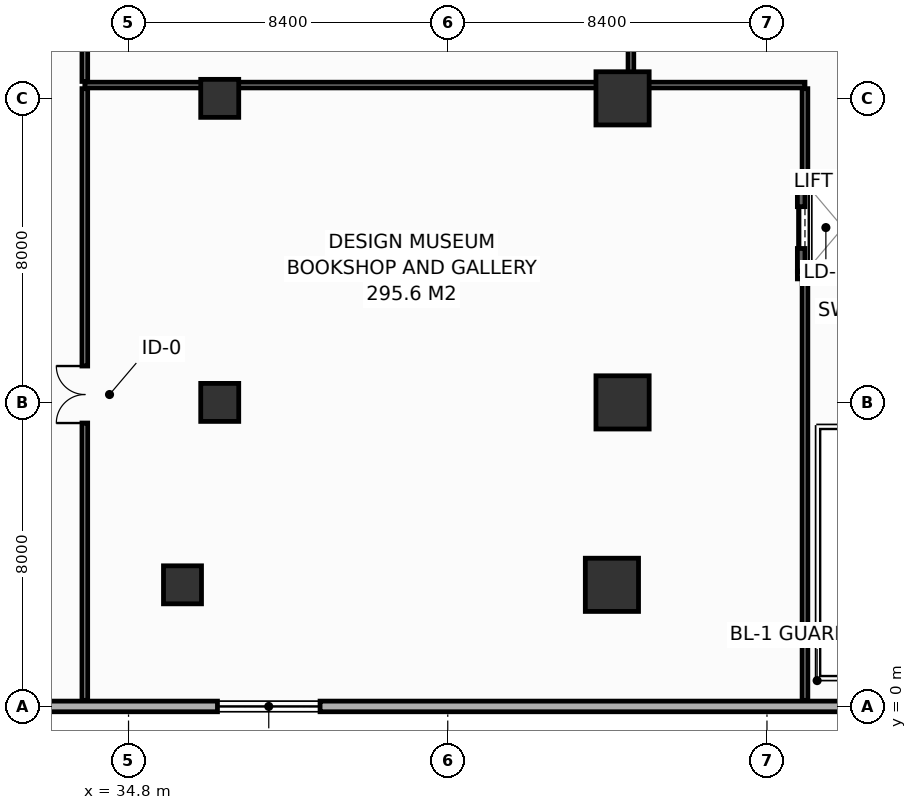
"""IFC4 building model, lengths in metres.
Left out: names, types, materials, properties, quantities, classifications, styles, units other than length and angle.
Written with IfcOpenShell. Run it as: python <this file> out.ifc"""

import sys

from ifc_helpers import new_model, si_unit, direction, frame, frame_2d, origin, origin_2d, place, context, subcontext, project, spatial, rectangle, hollow_rectangle, extrude, element, fill, save


model = new_model("IFC4")
c1 = context("Model", 3, precision=1e-05, world=origin(), true_north=direction((0.0, 1.0)))
c2 = subcontext(c1, "Body", "Model", "MODEL_VIEW")
j1 = project(units=[si_unit("LENGTHUNIT", "METRE"), si_unit("PLANEANGLEUNIT", "RADIAN")], contexts=[c1])
p1 = place(None, origin())
s1 = spatial("IfcSite", under=j1, at=p1, CompositionType="ELEMENT")
p2 = place(p1, origin())
s2 = spatial("IfcBuilding", under=s1, at=p2, CompositionType="ELEMENT")
p3 = place(p2, origin())
s3 = spatial("IfcBuildingStorey", under=s2, at=p3, CompositionType="ELEMENT", Elevation=0.0)
p4 = place(p3, frame((36.22, 3.2, 0.0), z_axis=(0.0, 0.0, 1.0), x_axis=(1.0, 0.0, 0.0)))
e1 = element("IfcColumn", 1, at=p4, inside=s3, PredefinedType="COLUMN", context=c2, shape_type="SweptSolid", body=[
    extrude(hollow_rectangle(XDim=1.0, YDim=1.0, WallThickness=0.045, at=origin_2d()), origin(), (0.0, 0.0, 1.0), 6.0),
])
p5 = place(p3, frame((47.52, 3.2, 0.0), z_axis=(0.0, 0.0, 1.0), x_axis=(1.0, 0.0, 0.0)))
e2 = element("IfcColumn", 2, at=p5, inside=s3, PredefinedType="COLUMN", context=c2, shape_type="SweptSolid", body=[
    extrude(hollow_rectangle(XDim=1.4, YDim=1.4, WallThickness=0.065, at=origin_2d()), origin(), (0.0, 0.0, 1.0), 6.0),
])
p6 = place(p3, frame((37.2, 8.0, 0.0), z_axis=(0.0, 0.0, 1.0), x_axis=(1.0, 0.0, 0.0)))
e3 = element("IfcColumn", 3, at=p6, inside=s3, PredefinedType="COLUMN", context=c2, shape_type="SweptSolid", body=[
    extrude(hollow_rectangle(XDim=1.0, YDim=1.0, WallThickness=0.045, at=origin_2d()), origin(), (0.0, 0.0, 1.0), 6.0),
])
p7 = place(p3, frame((47.8, 8.0, 0.0), z_axis=(0.0, 0.0, 1.0), x_axis=(1.0, 0.0, 0.0)))
e4 = element("IfcColumn", 4, at=p7, inside=s3, PredefinedType="COLUMN", context=c2, shape_type="SweptSolid", body=[
    extrude(hollow_rectangle(XDim=1.4, YDim=1.4, WallThickness=0.065, at=origin_2d()), origin(), (0.0, 0.0, 1.0), 6.0),
])
p8 = place(p3, frame((37.2, 16.0, 0.0), z_axis=(0.0, 0.0, 1.0), x_axis=(1.0, 0.0, 0.0)))
e5 = element("IfcColumn", 5, at=p8, inside=s3, PredefinedType="COLUMN", context=c2, shape_type="SweptSolid", body=[
    extrude(hollow_rectangle(XDim=1.0, YDim=1.0, WallThickness=0.045, at=origin_2d()), origin(), (0.0, 0.0, 1.0), 6.0),
])
p9 = place(p3, frame((47.8, 16.0, 0.0), z_axis=(0.0, 0.0, 1.0), x_axis=(1.0, 0.0, 0.0)))
e6 = element("IfcColumn", 6, at=p9, inside=s3, PredefinedType="COLUMN", context=c2, shape_type="SweptSolid", body=[
    extrude(hollow_rectangle(XDim=1.4, YDim=1.4, WallThickness=0.065, at=origin_2d()), origin(), (0.0, 0.0, 1.0), 6.0),
])
for number, where, z_axis, x_axis in (
    (7, (52.4, 11.35, 0.0), (0.0, 0.0, 1.0), (1.0, 0.0, 0.0)),
    (8, (52.4, 13.85, 0.0), (0.0, 0.0, 1.0), (1.0, 0.0, 0.0)),
):
    element("IfcWall", number, at=place(p3, frame(where, z_axis=z_axis, x_axis=x_axis)), inside=s3, PredefinedType="SHEAR", context=c2, shape_type="SweptSolid", body=[
        extrude(rectangle(XDim=2.4, YDim=0.2, at=frame_2d((1.2, 0.0))), origin(), (0.0, 0.0, 1.0), 5.48),
    ])
p10 = place(p3, frame((52.5, 11.45, 0.0), z_axis=(0.0, 0.0, 1.0), x_axis=(0.0, 1.0, 0.0)))
e9 = element("IfcWall", 9, at=p10, inside=s3, PredefinedType="SHEAR", context=c2, shape_type="SweptSolid", body=[
    extrude(rectangle(XDim=2.3, YDim=0.2, at=frame_2d((1.15, 0.0))), origin(), (0.0, 0.0, 1.0), 5.48),
])
p11 = place(p10, frame((0.6, 0.0, 0.0)))
e10 = element("IfcOpeningElement", 10, at=p11, cuts=e9, PredefinedType="OPENING", context=c2, shape_type="SweptSolid", body=[
    extrude(rectangle(XDim=1.1, YDim=2.2, at=frame_2d((0.55, 1.1))), frame((0.0, 0.11, 0.0), z_axis=(0.0, -1.0, 0.0), x_axis=(1.0, 0.0, 0.0)), (0.0, 0.0, 1.0), 0.22),
])
p12 = place(p3, frame((56.64, 0.0, 0.0), z_axis=(0.0, 0.0, 1.0), x_axis=(-1.0, 0.0, 0.0)))
e11 = element("IfcWall", 11, at=p12, inside=s3, PredefinedType="STANDARD", context=c2, shape_type="SweptSolid", body=[
    extrude(rectangle(XDim=53.28, YDim=0.28, at=frame_2d((26.64, 0.0))), origin(), (0.0, 0.0, 1.0), 5.7),
])
p13 = place(p12, frame((37.18, 0.0, 0.0)))
e12 = element("IfcOpeningElement", 12, at=p13, cuts=e11, PredefinedType="OPENING", context=c2, shape_type="SweptSolid", body=[
    extrude(rectangle(XDim=2.0, YDim=2.5, at=frame_2d((1.0, 1.25))), frame((0.0, 0.15, 0.0), z_axis=(0.0, -1.0, 0.0), x_axis=(1.0, 0.0, 0.0)), (0.0, 0.0, 1.0), 0.3),
])
p14 = place(p12, frame((28.38, 0.0, 0.0)))
e13 = element("IfcOpeningElement", 13, at=p14, cuts=e11, PredefinedType="OPENING", context=c2, shape_type="SweptSolid", body=[
    extrude(rectangle(XDim=1.8, YDim=2.4, at=frame_2d((0.9, 1.2))), frame((0.0, 0.15, 0.0), z_axis=(0.0, -1.0, 0.0), x_axis=(1.0, 0.0, 0.0)), (0.0, 0.0, 1.0), 0.3),
])
p15 = place(p12, frame((48.0, 0.0, 0.9)))
e14 = element("IfcOpeningElement", 14, at=p15, cuts=e11, PredefinedType="OPENING", context=c2, shape_type="SweptSolid", body=[
    extrude(rectangle(XDim=2.7, YDim=2.9, at=frame_2d((1.35, 1.45))), frame((0.0, 0.15, 0.0), z_axis=(0.0, -1.0, 0.0), x_axis=(1.0, 0.0, 0.0)), (0.0, 0.0, 1.0), 0.3),
])
p16 = place(p12, frame((16.8, 0.0, 0.9)))
e15 = element("IfcOpeningElement", 15, at=p16, cuts=e11, PredefinedType="OPENING", context=c2, shape_type="SweptSolid", body=[
    extrude(rectangle(XDim=2.7, YDim=2.9, at=frame_2d((1.35, 1.45))), frame((0.0, 0.15, 0.0), z_axis=(0.0, -1.0, 0.0), x_axis=(1.0, 0.0, 0.0)), (0.0, 0.0, 1.0), 0.3),
])
p17 = place(p3, frame((33.65, 16.35, 0.0), z_axis=(0.0, 0.0, 1.0), x_axis=(1.0, 0.0, 0.0)))
e16 = element("IfcWall", 16, at=p17, inside=s3, PredefinedType="PARTITIONING", context=c2, shape_type="SweptSolid", body=[
    extrude(rectangle(XDim=18.95, YDim=0.15, at=frame_2d((9.475, 0.0))), origin(), (0.0, 0.0, 1.0), 4.285),
])
p18 = place(p3, frame((52.6, 0.16, 0.0), z_axis=(0.0, 0.0, 1.0), x_axis=(0.0, 1.0, 0.0)))
e17 = element("IfcWall", 17, at=p18, inside=s3, PredefinedType="PARTITIONING", context=c2, shape_type="SweptSolid", body=[
    extrude(rectangle(XDim=11.07, YDim=0.15, at=frame_2d((5.535, 0.0))), origin(), (0.0, 0.0, 1.0), 4.785),
])
p19 = place(p3, frame((52.6, 13.97, 0.0), z_axis=(0.0, 0.0, 1.0), x_axis=(0.0, 1.0, 0.0)))
e18 = element("IfcWall", 18, at=p19, inside=s3, PredefinedType="PARTITIONING", context=c2, shape_type="SweptSolid", body=[
    extrude(rectangle(XDim=2.285, YDim=0.15, at=frame_2d((1.143, 0.0))), origin(), (0.0, 0.0, 1.0), 4.785),
])
p20 = place(p3, frame((33.65, 0.16, 0.0), z_axis=(0.0, 0.0, 1.0), x_axis=(0.0, 1.0, 0.0)))
e19 = element("IfcWall", 19, at=p20, inside=s3, PredefinedType="PARTITIONING", context=c2, shape_type="SweptSolid", body=[
    extrude(rectangle(XDim=16.095, YDim=0.15, at=frame_2d((8.047, 0.0))), origin(), (0.0, 0.0, 1.0), 4.285),
])
p21 = place(p20, frame((7.297, 0.0, 0.0)))
e20 = element("IfcOpeningElement", 20, at=p21, cuts=e19, PredefinedType="OPENING", context=c2, shape_type="SweptSolid", body=[
    extrude(rectangle(XDim=1.5, YDim=2.2, at=frame_2d((0.75, 1.1))), frame((0.0, 0.085, 0.0), z_axis=(0.0, -1.0, 0.0), x_axis=(1.0, 0.0, 0.0)), (0.0, 0.0, 1.0), 0.17),
])
p22 = place(p3, frame((33.65, 16.445, 0.0), z_axis=(0.0, 0.0, 1.0), x_axis=(0.0, 1.0, 0.0)))
e21 = element("IfcWall", 21, at=p22, inside=s3, PredefinedType="PARTITIONING", context=c2, shape_type="SweptSolid", body=[
    extrude(rectangle(XDim=19.505, YDim=0.15, at=frame_2d((9.752, 0.0))), origin(), (0.0, 0.0, 1.0), 5.185),
])
p23 = place(p3, frame((48.02, 16.445, 0.0), z_axis=(0.0, 0.0, 1.0), x_axis=(0.0, 1.0, 0.0)))
e22 = element("IfcWall", 22, at=p23, inside=s3, PredefinedType="PARTITIONING", context=c2, shape_type="SweptSolid", body=[
    extrude(rectangle(XDim=1.555, YDim=0.15, at=frame_2d((0.777, 0.0))), origin(), (0.0, 0.0, 1.0), 4.785),
])
p24 = place(p11, origin())
e23 = element("IfcDoor", 23, at=p24, inside=s3, OperationType="SLIDING_TO_LEFT", PredefinedType="DOOR", context=c2, shape_type="SweptSolid", body=[
    extrude(rectangle(XDim=1.1, YDim=2.2, at=frame_2d((0.55, 1.1))), frame((0.0, 0.025, 0.0), z_axis=(0.0, -1.0, 0.0), x_axis=(1.0, 0.0, 0.0)), (0.0, 0.0, 1.0), 0.05),
])
fill(e10, e23)
p25 = place(p16, origin())
e24 = element("IfcWindow", 24, at=p25, inside=s3, PartitioningType="TRIPLE_PANEL_VERTICAL", PredefinedType="WINDOW", context=c2, shape_type="SweptSolid", body=[
    extrude(rectangle(XDim=2.7, YDim=2.9, at=frame_2d((1.35, 1.45))), frame((0.0, 0.03, 0.0), z_axis=(0.0, -1.0, 0.0), x_axis=(1.0, 0.0, 0.0)), (0.0, 0.0, 1.0), 0.06),
])
fill(e15, e24)
p26 = place(p21, origin())
e25 = element("IfcDoor", 25, at=p26, inside=s3, OperationType="DOUBLE_DOOR_SINGLE_SWING", PredefinedType="DOOR", context=c2, shape_type="SweptSolid", body=[
    extrude(rectangle(XDim=1.5, YDim=2.2, at=frame_2d((0.75, 1.1))), frame((0.0, 0.025, 0.0), z_axis=(0.0, -1.0, 0.0), x_axis=(1.0, 0.0, 0.0)), (0.0, 0.0, 1.0), 0.05),
])
fill(e20, e25)
save(model, sys.argv[1])
